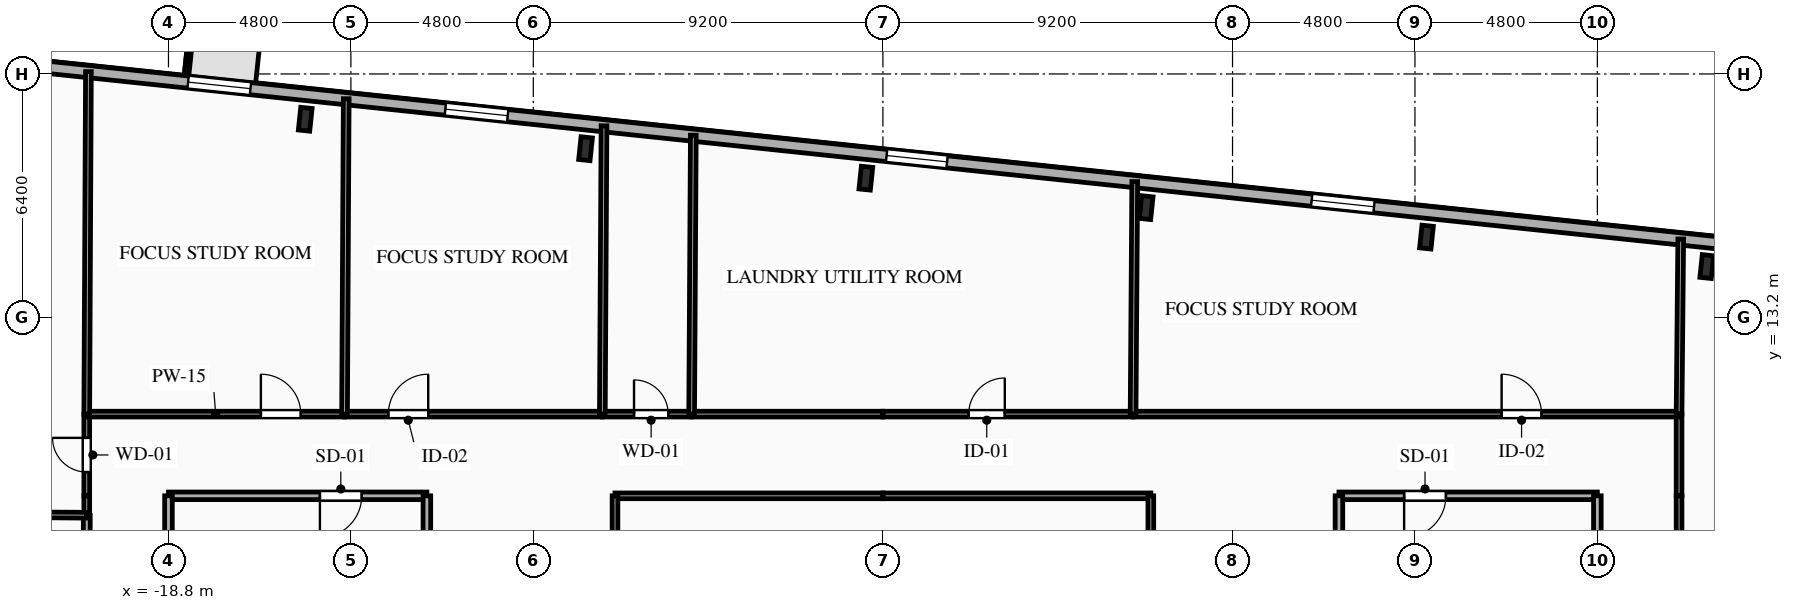
"""IFC4 building model, lengths in metres.
Left out: names, types, materials, properties, quantities, classifications, styles, units other than length and angle.
Written with IfcOpenShell. Run it as: python <this file> out.ifc"""

import sys

from ifc_helpers import new_model, si_unit, direction, frame, frame_2d, origin, origin_2d, place, context, subcontext, project, spatial, rectangle, i_section, extrude, element, fill, save


model = new_model("IFC4")
c1 = context("Model", 3, precision=1e-05, world=origin(), true_north=direction((0.0, 1.0)))
c2 = subcontext(c1, "Body", "Model", "MODEL_VIEW")
j1 = project(units=[si_unit("LENGTHUNIT", "METRE"), si_unit("PLANEANGLEUNIT", "RADIAN")], contexts=[c1])
p1 = place(None, origin())
s1 = spatial("IfcSite", under=j1, at=p1, CompositionType="ELEMENT")
p2 = place(p1, origin())
s2 = spatial("IfcBuilding", under=s1, at=p2, CompositionType="ELEMENT")
p3 = place(p2, frame((0.0, 0.0, 216.5)))
s3 = spatial("IfcBuildingStorey", under=s2, at=p3, CompositionType="ELEMENT", Elevation=216.5)
for number, where, z_axis, x_axis in (
    (1, (21.679, 14.532, 0.0), (0.0, 0.0, 1.0), (0.995, -0.105, 0.0)),
    (2, (14.303, 15.308, 0.0), (0.0, 0.0, 1.0), (0.995, -0.105, 0.0)),
    (3, (6.927, 16.083, 0.0), (0.0, 0.0, 1.0), (0.995, -0.105, 0.0)),
    (4, (-0.449, 16.858, 0.0), (0.0, 0.0, 1.0), (0.995, -0.105, 0.0)),
    (5, (-7.825, 17.634, 0.0), (0.0, 0.0, 1.0), (0.995, -0.105, 0.0)),
    (6, (-15.201, 18.409, 0.0), (0.0, 0.0, 1.0), (0.995, -0.105, 0.0)),
):
    element("IfcColumn", number, at=place(p3, frame(where, z_axis=z_axis, x_axis=x_axis)), inside=s3, PredefinedType="COLUMN", context=c2, shape_type="SweptSolid", body=[
        extrude(i_section(OverallWidth=0.3, OverallDepth=0.6, WebThickness=0.015, FlangeThickness=0.03, FilletRadius=0.027, at=origin_2d()), origin(), (0.0, 0.0, 1.0), 3.35),
    ])
p4 = place(p3, frame((-23.156, 19.898, 0.0), z_axis=(0.0, 0.0, 1.0), x_axis=(0.994522001802, -0.104527450613, 0.0)))
e7 = element("IfcWall", 7, at=p4, inside=s3, PredefinedType="SOLIDWALL", context=c2, shape_type="SweptSolid", body=[
    extrude(rectangle(XDim=45.8, YDim=0.32, at=frame_2d((22.9, 0.0))), origin(), (0.0, 0.0, 1.0), 3.04),
])
p5 = place(p4, frame((4.9, 0.0, 0.85)))
e8 = element("IfcOpeningElement", 8, at=p5, cuts=e7, PredefinedType="OPENING", context=c2, shape_type="SweptSolid", body=[
    extrude(rectangle(XDim=1.65, YDim=1.85, at=frame_2d((0.825, 0.925))), frame((0.0, 0.17, 0.0), z_axis=(0.0, -1.0, 0.0), x_axis=(1.0, 0.0, 0.0)), (0.0, 0.0, 1.0), 0.34),
])
p6 = place(p4, frame((11.706, 0.0, 0.85)))
e9 = element("IfcOpeningElement", 9, at=p6, cuts=e7, PredefinedType="OPENING", context=c2, shape_type="SweptSolid", body=[
    extrude(rectangle(XDim=1.65, YDim=1.85, at=frame_2d((0.825, 0.925))), frame((0.0, 0.17, 0.0), z_axis=(0.0, -1.0, 0.0), x_axis=(1.0, 0.0, 0.0)), (0.0, 0.0, 1.0), 0.34),
])
p7 = place(p4, frame((23.381, 0.0, 0.85)))
e10 = element("IfcOpeningElement", 10, at=p7, cuts=e7, PredefinedType="OPENING", context=c2, shape_type="SweptSolid", body=[
    extrude(rectangle(XDim=1.6, YDim=1.85, at=frame_2d((0.8, 0.925))), frame((0.0, 0.17, 0.0), z_axis=(0.0, -1.0, 0.0), x_axis=(1.0, 0.0, 0.0)), (0.0, 0.0, 1.0), 0.34),
])
p8 = place(p4, frame((34.628, 0.0, 0.85)))
e11 = element("IfcOpeningElement", 11, at=p8, cuts=e7, PredefinedType="OPENING", context=c2, shape_type="SweptSolid", body=[
    extrude(rectangle(XDim=1.65, YDim=1.85, at=frame_2d((0.825, 0.925))), frame((0.0, 0.17, 0.0), z_axis=(0.0, -1.0, 0.0), x_axis=(1.0, 0.0, 0.0)), (0.0, 0.0, 1.0), 0.34),
])
p9 = place(p3, frame((-12.0, 8.5, 0.0), z_axis=(0.0, 0.0, 1.0), x_axis=(-1.0, 0.0, 0.0)))
e12 = element("IfcWall", 12, at=p9, inside=s3, PredefinedType="PARTITIONING", context=c2, shape_type="SweptSolid", body=[
    extrude(rectangle(XDim=6.8, YDim=0.2, at=frame_2d((3.4, 0.0))), origin(), (0.0, 0.0, 1.0), 3.04),
])
p10 = place(p9, frame((1.715, 0.0, 0.0)))
e13 = element("IfcOpeningElement", 13, at=p10, cuts=e12, PredefinedType="OPENING", context=c2, shape_type="SweptSolid", body=[
    extrude(rectangle(XDim=1.1, YDim=2.15, at=frame_2d((0.55, 1.075))), frame((0.0, 0.11, 0.0), z_axis=(0.0, -1.0, 0.0), x_axis=(1.0, 0.0, 0.0)), (0.0, 0.0, 1.0), 0.22),
])
p11 = place(p3, frame((-18.8, 8.5, 0.0), z_axis=(0.0, 0.0, 1.0), x_axis=(0.0, -1.0, 0.0)))
e14 = element("IfcWall", 14, at=p11, inside=s3, PredefinedType="PARTITIONING", context=c2, shape_type="SweptSolid", body=[
    extrude(rectangle(XDim=2.9, YDim=0.2, at=frame_2d((1.45, 0.0))), origin(), (0.0, 0.0, 1.0), 2.665),
])
p12 = place(p3, frame((-12.0, 5.6, 0.0), z_axis=(0.0, 0.0, 1.0), x_axis=(0.0, 1.0, 0.0)))
e15 = element("IfcWall", 15, at=p12, inside=s3, PredefinedType="PARTITIONING", context=c2, shape_type="SweptSolid", body=[
    extrude(rectangle(XDim=2.9, YDim=0.2, at=frame_2d((1.45, 0.0))), origin(), (0.0, 0.0, 1.0), 3.04),
])
p13 = place(p3, frame((18.8, 8.5, 0.0), z_axis=(0.0, 0.0, 1.0), x_axis=(-1.0, 0.0, 0.0)))
e16 = element("IfcWall", 16, at=p13, inside=s3, PredefinedType="PARTITIONING", context=c2, shape_type="SweptSolid", body=[
    extrude(rectangle(XDim=6.8, YDim=0.2, at=frame_2d((3.4, 0.0))), origin(), (0.0, 0.0, 1.0), 3.04),
])
p14 = place(p13, frame((3.985, 0.0, 0.0)))
e17 = element("IfcOpeningElement", 17, at=p14, cuts=e16, PredefinedType="OPENING", context=c2, shape_type="SweptSolid", body=[
    extrude(rectangle(XDim=1.1, YDim=2.15, at=frame_2d((0.55, 1.075))), frame((0.0, 0.11, 0.0), z_axis=(0.0, -1.0, 0.0), x_axis=(1.0, 0.0, 0.0)), (0.0, 0.0, 1.0), 0.22),
])
p15 = place(p3, frame((18.8, 5.6, 0.0), z_axis=(0.0, 0.0, 1.0), x_axis=(0.0, 1.0, 0.0)))
e18 = element("IfcWall", 18, at=p15, inside=s3, PredefinedType="PARTITIONING", context=c2, shape_type="SweptSolid", body=[
    extrude(rectangle(XDim=2.9, YDim=0.2, at=frame_2d((1.45, 0.0))), origin(), (0.0, 0.0, 1.0), 2.665),
])
p16 = place(p3, frame((12.0, 8.5, 0.0), z_axis=(0.0, 0.0, 1.0), x_axis=(0.0, -1.0, 0.0)))
e19 = element("IfcWall", 19, at=p16, inside=s3, PredefinedType="PARTITIONING", context=c2, shape_type="SweptSolid", body=[
    extrude(rectangle(XDim=2.9, YDim=0.2, at=frame_2d((1.45, 0.0))), origin(), (0.0, 0.0, 1.0), 3.04),
])
p17 = place(p3, frame((-20.95, 8.5, 0.0), z_axis=(0.0, 0.0, 1.0), x_axis=(0.0, 1.0, 0.0)))
e20 = element("IfcWall", 20, at=p17, inside=s3, PredefinedType="PARTITIONING", context=c2, shape_type="SweptSolid", body=[
    extrude(rectangle(XDim=2.15, YDim=0.15, at=frame_2d((1.075, 0.0))), origin(), (0.0, 0.0, 1.0), 3.04),
])
p18 = place(p17, frame((0.625, 0.0, 0.0)))
e21 = element("IfcOpeningElement", 21, at=p18, cuts=e20, PredefinedType="OPENING", context=c2, shape_type="SweptSolid", body=[
    extrude(rectangle(XDim=0.9, YDim=2.1, at=frame_2d((0.45, 1.05))), frame((0.0, 0.085, 0.0), z_axis=(0.0, -1.0, 0.0), x_axis=(1.0, 0.0, 0.0)), (0.0, 0.0, 1.0), 0.17),
])
p19 = place(p3, frame((-20.95, 10.65, 0.0), z_axis=(0.0, 0.0, 1.0), x_axis=(1.0, 0.0, 0.0)))
e22 = element("IfcWall", 22, at=p19, inside=s3, PredefinedType="PARTITIONING", context=c2, shape_type="SweptSolid", body=[
    extrude(rectangle(XDim=6.783, YDim=0.15, at=frame_2d((3.392, 0.0))), origin(), (0.0, 0.0, 1.0), 3.04),
])
p20 = place(p19, frame((4.582, 0.0, 0.0)))
e23 = element("IfcOpeningElement", 23, at=p20, cuts=e22, PredefinedType="OPENING", context=c2, shape_type="SweptSolid", body=[
    extrude(rectangle(XDim=1.05, YDim=2.15, at=frame_2d((0.525, 1.075))), frame((0.0, 0.085, 0.0), z_axis=(0.0, -1.0, 0.0), x_axis=(1.0, 0.0, 0.0)), (0.0, 0.0, 1.0), 0.17),
])
p21 = place(p3, frame((-14.167, 10.65, 0.0), z_axis=(0.0, 0.0, 1.0), x_axis=(1.0, 0.0, 0.0)))
e24 = element("IfcWall", 24, at=p21, inside=s3, PredefinedType="PARTITIONING", context=c2, shape_type="SweptSolid", body=[
    extrude(rectangle(XDim=6.783, YDim=0.15, at=frame_2d((3.392, 0.0))), origin(), (0.0, 0.0, 1.0), 3.04),
])
p22 = place(p21, frame((1.152, 0.0, 0.0)))
e25 = element("IfcOpeningElement", 25, at=p22, cuts=e24, PredefinedType="OPENING", context=c2, shape_type="SweptSolid", body=[
    extrude(rectangle(XDim=1.05, YDim=2.15, at=frame_2d((0.525, 1.075))), frame((0.0, 0.085, 0.0), z_axis=(0.0, -1.0, 0.0), x_axis=(1.0, 0.0, 0.0)), (0.0, 0.0, 1.0), 0.17),
])
p23 = place(p3, frame((-7.383, 10.65, 0.0), z_axis=(0.0, 0.0, 1.0), x_axis=(1.0, 0.0, 0.0)))
e26 = element("IfcWall", 26, at=p23, inside=s3, PredefinedType="PLUMBINGWALL", context=c2, shape_type="SweptSolid", body=[
    extrude(rectangle(XDim=2.35, YDim=0.15, at=frame_2d((1.175, 0.0))), origin(), (0.0, 0.0, 1.0), 3.04),
])
p24 = place(p23, frame((0.834, 0.0, 0.0)))
e27 = element("IfcOpeningElement", 27, at=p24, cuts=e26, PredefinedType="OPENING", context=c2, shape_type="SweptSolid", body=[
    extrude(rectangle(XDim=0.9, YDim=2.1, at=frame_2d((0.45, 1.05))), frame((0.0, 0.085, 0.0), z_axis=(0.0, -1.0, 0.0), x_axis=(1.0, 0.0, 0.0)), (0.0, 0.0, 1.0), 0.17),
])
p25 = place(p3, frame((-5.033, 10.65, 0.0), z_axis=(0.0, 0.0, 1.0), x_axis=(1.0, 0.0, 0.0)))
e28 = element("IfcWall", 28, at=p25, inside=s3, PredefinedType="PARTITIONING", context=c2, shape_type="SweptSolid", body=[
    extrude(rectangle(XDim=5.033, YDim=0.15, at=frame_2d((2.517, 0.0))), origin(), (0.0, 0.0, 1.0), 3.04),
])
p26 = place(p3, frame((0.0, 8.5, 0.0), z_axis=(0.0, 0.0, 1.0), x_axis=(-1.0, 0.0, 0.0)))
e29 = element("IfcWall", 29, at=p26, inside=s3, PredefinedType="PARTITIONING", context=c2, shape_type="SweptSolid", body=[
    extrude(rectangle(XDim=7.05, YDim=0.15, at=frame_2d((3.525, 0.0))), origin(), (0.0, 0.0, 1.0), 3.04),
])
p27 = place(p3, frame((20.95, 10.65, 0.0), z_axis=(0.0, 0.0, 1.0), x_axis=(0.0, -1.0, 0.0)))
e30 = element("IfcWall", 30, at=p27, inside=s3, PredefinedType="PARTITIONING", context=c2, shape_type="SweptSolid", body=[
    extrude(rectangle(XDim=2.15, YDim=0.15, at=frame_2d((1.075, 0.0))), origin(), (0.0, 0.0, 1.0), 3.04),
])
p28 = place(p3, frame((0.0, 10.65, 0.0), z_axis=(0.0, 0.0, 1.0), x_axis=(1.0, 0.0, 0.0)))
e31 = element("IfcWall", 31, at=p28, inside=s3, PredefinedType="PARTITIONING", context=c2, shape_type="SweptSolid", body=[
    extrude(rectangle(XDim=6.583, YDim=0.15, at=frame_2d((3.292, 0.0))), origin(), (0.0, 0.0, 1.0), 3.04),
])
p29 = place(p28, frame((2.257, 0.0, 0.0)))
e32 = element("IfcOpeningElement", 32, at=p29, cuts=e31, PredefinedType="OPENING", context=c2, shape_type="SweptSolid", body=[
    extrude(rectangle(XDim=0.95, YDim=2.1, at=frame_2d((0.475, 1.05))), frame((0.0, 0.085, 0.0), z_axis=(0.0, -1.0, 0.0), x_axis=(1.0, 0.0, 0.0)), (0.0, 0.0, 1.0), 0.17),
])
p30 = place(p3, frame((6.583, 10.65, 0.0), z_axis=(0.0, 0.0, 1.0), x_axis=(1.0, 0.0, 0.0)))
e33 = element("IfcWall", 33, at=p30, inside=s3, PredefinedType="PARTITIONING", context=c2, shape_type="SweptSolid", body=[
    extrude(rectangle(XDim=14.367, YDim=0.15, at=frame_2d((7.184, 0.0))), origin(), (0.0, 0.0, 1.0), 3.04),
])
p31 = place(p30, frame((9.698, 0.0, 0.0)))
e34 = element("IfcOpeningElement", 34, at=p31, cuts=e33, PredefinedType="OPENING", context=c2, shape_type="SweptSolid", body=[
    extrude(rectangle(XDim=1.05, YDim=2.15, at=frame_2d((0.525, 1.075))), frame((0.0, 0.085, 0.0), z_axis=(0.0, -1.0, 0.0), x_axis=(1.0, 0.0, 0.0)), (0.0, 0.0, 1.0), 0.17),
])
p32 = place(p3, frame((7.05, 8.5, 0.0), z_axis=(0.0, 0.0, 1.0), x_axis=(-1.0, 0.0, 0.0)))
e35 = element("IfcWall", 35, at=p32, inside=s3, PredefinedType="PARTITIONING", context=c2, shape_type="SweptSolid", body=[
    extrude(rectangle(XDim=7.05, YDim=0.15, at=frame_2d((3.525, 0.0))), origin(), (0.0, 0.0, 1.0), 3.04),
])
p33 = place(p3, frame((-20.95, -1.306, 0.0), z_axis=(0.0, 0.0, 1.0), x_axis=(0.0, 1.0, 0.0)))
e36 = element("IfcWall", 36, at=p33, inside=s3, PredefinedType="PARTITIONING", context=c2, shape_type="SweptSolid", body=[
    extrude(rectangle(XDim=9.296, YDim=0.18, at=frame_2d((4.648, 0.0))), origin(), (0.0, 0.0, 1.0), 3.04),
])
p34 = place(p33, frame((1.472, 0.0, 0.0)))
e37 = element("IfcOpeningElement", 37, at=p34, cuts=e36, PredefinedType="OPENING", context=c2, shape_type="SweptSolid", body=[
    extrude(rectangle(XDim=1.0, YDim=2.15, at=frame_2d((0.5, 1.075))), frame((0.0, 0.1, 0.0), z_axis=(0.0, -1.0, 0.0), x_axis=(1.0, 0.0, 0.0)), (0.0, 0.0, 1.0), 0.2),
])
p35 = place(p3, frame((-20.95, 7.99, 0.0), z_axis=(0.0, 0.0, 1.0), x_axis=(0.0, 1.0, 0.0)))
e38 = element("IfcWall", 38, at=p35, inside=s3, PredefinedType="PARTITIONING", context=c2, shape_type="SweptSolid", body=[
    extrude(rectangle(XDim=0.51, YDim=0.15, at=frame_2d((0.255, 0.0))), origin(), (0.0, 0.0, 1.0), 3.04),
])
p36 = place(p3, frame((20.95, 8.5, 0.0), z_axis=(0.0, 0.0, 1.0), x_axis=(0.0, -1.0, 0.0)))
e39 = element("IfcWall", 39, at=p36, inside=s3, PredefinedType="PARTITIONING", context=c2, shape_type="SweptSolid", body=[
    extrude(rectangle(XDim=9.263, YDim=0.15, at=frame_2d((4.632, 0.0))), origin(), (0.0, 0.0, 1.0), 2.695),
])
p37 = place(p36, frame((6.751, 0.0, 0.0)))
e40 = element("IfcOpeningElement", 40, at=p37, cuts=e39, PredefinedType="OPENING", context=c2, shape_type="SweptSolid", body=[
    extrude(rectangle(XDim=1.05, YDim=2.15, at=frame_2d((0.525, 1.075))), frame((0.0, 0.085, 0.0), z_axis=(0.0, -1.0, 0.0), x_axis=(1.0, 0.0, 0.0)), (0.0, 0.0, 1.0), 0.17),
])
for number, where, z_axis, x_axis in (
    (41, (-7.05, 8.5, 0.0), (0.0, 0.0, 1.0), (0.0, -1.0, 0.0)),
    (42, (7.05, -0.8, 0.0), (0.0, 0.0, 1.0), (0.0, 1.0, 0.0)),
):
    element("IfcWall", number, at=place(p3, frame(where, z_axis=z_axis, x_axis=x_axis)), inside=s3, PredefinedType="PARTITIONING", context=c2, shape_type="SweptSolid", body=[
        extrude(rectangle(XDim=9.3, YDim=0.15, at=frame_2d((4.65, 0.0))), origin(), (0.0, 0.0, 1.0), 3.04),
    ])
p38 = place(p3, frame((-27.419, 8.034, 0.0), z_axis=(0.0, 0.0, 1.0), x_axis=(0.999976928608, -0.006792808784, 0.0)))
e43 = element("IfcWall", 43, at=p38, inside=s3, PredefinedType="PARTITIONING", context=c2, shape_type="SweptSolid", body=[
    extrude(rectangle(XDim=6.469, YDim=0.15, at=frame_2d((3.235, 0.0))), origin(), (0.0, 0.0, 1.0), 3.04),
])
p39 = place(p3, frame((-20.906, 19.662, 0.0), z_axis=(0.0, 0.0, 1.0), x_axis=(-0.004876272857, -0.999988110911, 0.0)))
e44 = element("IfcWall", 44, at=p39, inside=s3, PredefinedType="PARTITIONING", context=c2, shape_type="SweptSolid", body=[
    extrude(rectangle(XDim=9.012, YDim=0.15, at=frame_2d((4.506, 0.0))), origin(), (0.0, 0.0, 1.0), 2.665),
])
p40 = place(p3, frame((20.95, 10.65, 0.0), z_axis=(0.0, 0.0, 1.0), x_axis=(0.009535990233, 0.999954531411, 0.0)))
e45 = element("IfcWall", 45, at=p40, inside=s3, PredefinedType="PARTITIONING", context=c2, shape_type="SweptSolid", body=[
    extrude(rectangle(XDim=4.608, YDim=0.15, at=frame_2d((2.304, 0.0))), origin(), (0.0, 0.0, 1.0), 2.665),
])
p41 = place(p3, frame((-14.123, 18.949, 0.0), z_axis=(0.0, 0.0, 1.0), x_axis=(-0.005295133602, -0.999985980682, 0.0)))
e46 = element("IfcWall", 46, at=p41, inside=s3, PredefinedType="PARTITIONING", context=c2, shape_type="SweptSolid", body=[
    extrude(rectangle(XDim=8.299, YDim=0.15, at=frame_2d((4.149, 0.0))), origin(), (0.0, 0.0, 1.0), 3.04),
])
p42 = place(p3, frame((-7.339, 18.236, 0.0), z_axis=(0.0, 0.0, 1.0), x_axis=(-0.005792713287, -0.999983222096, 0.0)))
e47 = element("IfcWall", 47, at=p42, inside=s3, PredefinedType="PLUMBINGWALL", context=c2, shape_type="SweptSolid", body=[
    extrude(rectangle(XDim=7.586, YDim=0.15, at=frame_2d((3.793, 0.0))), origin(), (0.0, 0.0, 1.0), 3.04),
])
p43 = place(p3, frame((-4.989, 17.989, 0.0), z_axis=(0.0, 0.0, 1.0), x_axis=(-0.005987717415, -0.999982073459, 0.0)))
e48 = element("IfcWall", 48, at=p43, inside=s3, PredefinedType="PLUMBINGWALL", context=c2, shape_type="SweptSolid", body=[
    extrude(rectangle(XDim=7.339, YDim=0.15, at=frame_2d((3.67, 0.0))), origin(), (0.0, 0.0, 1.0), 3.04),
])
p44 = place(p3, frame((6.627, 16.768, 0.0), z_axis=(0.0, 0.0, 1.0), x_axis=(-0.007182576093, -0.999974204968, 0.0)))
e49 = element("IfcWall", 49, at=p44, inside=s3, PredefinedType="PARTITIONING", context=c2, shape_type="SweptSolid", body=[
    extrude(rectangle(XDim=6.118, YDim=0.15, at=frame_2d((3.059, 0.0))), origin(), (0.0, 0.0, 1.0), 3.04),
])
p45 = place(p5, origin())
e50 = element("IfcWindow", 50, at=p45, inside=s3, PartitioningType="SINGLE_PANEL", PredefinedType="WINDOW", context=c2, shape_type="SweptSolid", body=[
    extrude(rectangle(XDim=1.65, YDim=1.85, at=frame_2d((0.825, 0.925))), frame((0.0, 0.03, 0.0), z_axis=(0.0, -1.0, 0.0), x_axis=(1.0, 0.0, 0.0)), (0.0, 0.0, 1.0), 0.06),
])
fill(e8, e50)
p46 = place(p6, origin())
e51 = element("IfcWindow", 51, at=p46, inside=s3, PartitioningType="SINGLE_PANEL", PredefinedType="WINDOW", context=c2, shape_type="SweptSolid", body=[
    extrude(rectangle(XDim=1.65, YDim=1.85, at=frame_2d((0.825, 0.925))), frame((0.0, 0.03, 0.0), z_axis=(0.0, -1.0, 0.0), x_axis=(1.0, 0.0, 0.0)), (0.0, 0.0, 1.0), 0.06),
])
fill(e9, e51)
p47 = place(p7, origin())
e52 = element("IfcWindow", 52, at=p47, inside=s3, PartitioningType="SINGLE_PANEL", PredefinedType="WINDOW", context=c2, shape_type="SweptSolid", body=[
    extrude(rectangle(XDim=1.6, YDim=1.85, at=frame_2d((0.8, 0.925))), frame((0.0, 0.03, 0.0), z_axis=(0.0, -1.0, 0.0), x_axis=(1.0, 0.0, 0.0)), (0.0, 0.0, 1.0), 0.06),
])
fill(e10, e52)
p48 = place(p8, origin())
e53 = element("IfcWindow", 53, at=p48, inside=s3, PartitioningType="SINGLE_PANEL", PredefinedType="WINDOW", context=c2, shape_type="SweptSolid", body=[
    extrude(rectangle(XDim=1.65, YDim=1.85, at=frame_2d((0.825, 0.925))), frame((0.0, 0.03, 0.0), z_axis=(0.0, -1.0, 0.0), x_axis=(1.0, 0.0, 0.0)), (0.0, 0.0, 1.0), 0.06),
])
fill(e11, e53)
p49 = place(p10, origin())
e54 = element("IfcDoor", 54, at=p49, inside=s3, OperationType="SINGLE_SWING_RIGHT", PredefinedType="DOOR", context=c2, shape_type="SweptSolid", body=[
    extrude(rectangle(XDim=1.1, YDim=2.15, at=frame_2d((0.55, 1.075))), frame((0.0, 0.025, 0.0), z_axis=(0.0, -1.0, 0.0), x_axis=(1.0, 0.0, 0.0)), (0.0, 0.0, 1.0), 0.05),
])
fill(e13, e54)
p50 = place(p14, origin())
e55 = element("IfcDoor", 55, at=p50, inside=s3, OperationType="SINGLE_SWING_RIGHT", PredefinedType="DOOR", context=c2, shape_type="SweptSolid", body=[
    extrude(rectangle(XDim=1.1, YDim=2.15, at=frame_2d((0.55, 1.075))), frame((0.0, 0.025, 0.0), z_axis=(0.0, -1.0, 0.0), x_axis=(1.0, 0.0, 0.0)), (0.0, 0.0, 1.0), 0.05),
])
fill(e17, e55)
p51 = place(p18, origin())
e56 = element("IfcDoor", 56, at=p51, inside=s3, OperationType="SINGLE_SWING_RIGHT", PredefinedType="DOOR", context=c2, shape_type="SweptSolid", body=[
    extrude(rectangle(XDim=0.9, YDim=2.1, at=frame_2d((0.45, 1.05))), frame((0.0, 0.025, 0.0), z_axis=(0.0, -1.0, 0.0), x_axis=(1.0, 0.0, 0.0)), (0.0, 0.0, 1.0), 0.05),
])
fill(e21, e56)
p52 = place(p20, origin())
e57 = element("IfcDoor", 57, at=p52, inside=s3, OperationType="SINGLE_SWING_LEFT", PredefinedType="DOOR", context=c2, shape_type="SweptSolid", body=[
    extrude(rectangle(XDim=1.05, YDim=2.15, at=frame_2d((0.525, 1.075))), frame((0.0, 0.025, 0.0), z_axis=(0.0, -1.0, 0.0), x_axis=(1.0, 0.0, 0.0)), (0.0, 0.0, 1.0), 0.05),
])
fill(e23, e57)
p53 = place(p22, origin())
e58 = element("IfcDoor", 58, at=p53, inside=s3, OperationType="SINGLE_SWING_RIGHT", PredefinedType="DOOR", context=c2, shape_type="SweptSolid", body=[
    extrude(rectangle(XDim=1.05, YDim=2.15, at=frame_2d((0.525, 1.075))), frame((0.0, 0.025, 0.0), z_axis=(0.0, -1.0, 0.0), x_axis=(1.0, 0.0, 0.0)), (0.0, 0.0, 1.0), 0.05),
])
fill(e25, e58)
p54 = place(p24, origin())
e59 = element("IfcDoor", 59, at=p54, inside=s3, OperationType="SINGLE_SWING_LEFT", PredefinedType="DOOR", context=c2, shape_type="SweptSolid", body=[
    extrude(rectangle(XDim=0.9, YDim=2.1, at=frame_2d((0.45, 1.05))), frame((0.0, 0.025, 0.0), z_axis=(0.0, -1.0, 0.0), x_axis=(1.0, 0.0, 0.0)), (0.0, 0.0, 1.0), 0.05),
])
fill(e27, e59)
p55 = place(p29, origin())
e60 = element("IfcDoor", 60, at=p55, inside=s3, OperationType="SINGLE_SWING_RIGHT", PredefinedType="DOOR", context=c2, shape_type="SweptSolid", body=[
    extrude(rectangle(XDim=0.95, YDim=2.1, at=frame_2d((0.475, 1.05))), frame((0.0, 0.025, 0.0), z_axis=(0.0, -1.0, 0.0), x_axis=(1.0, 0.0, 0.0)), (0.0, 0.0, 1.0), 0.05),
])
fill(e32, e60)
p56 = place(p31, origin())
e61 = element("IfcDoor", 61, at=p56, inside=s3, OperationType="SINGLE_SWING_LEFT", PredefinedType="DOOR", context=c2, shape_type="SweptSolid", body=[
    extrude(rectangle(XDim=1.05, YDim=2.15, at=frame_2d((0.525, 1.075))), frame((0.0, 0.025, 0.0), z_axis=(0.0, -1.0, 0.0), x_axis=(1.0, 0.0, 0.0)), (0.0, 0.0, 1.0), 0.05),
])
fill(e34, e61)
save(model, sys.argv[1])
